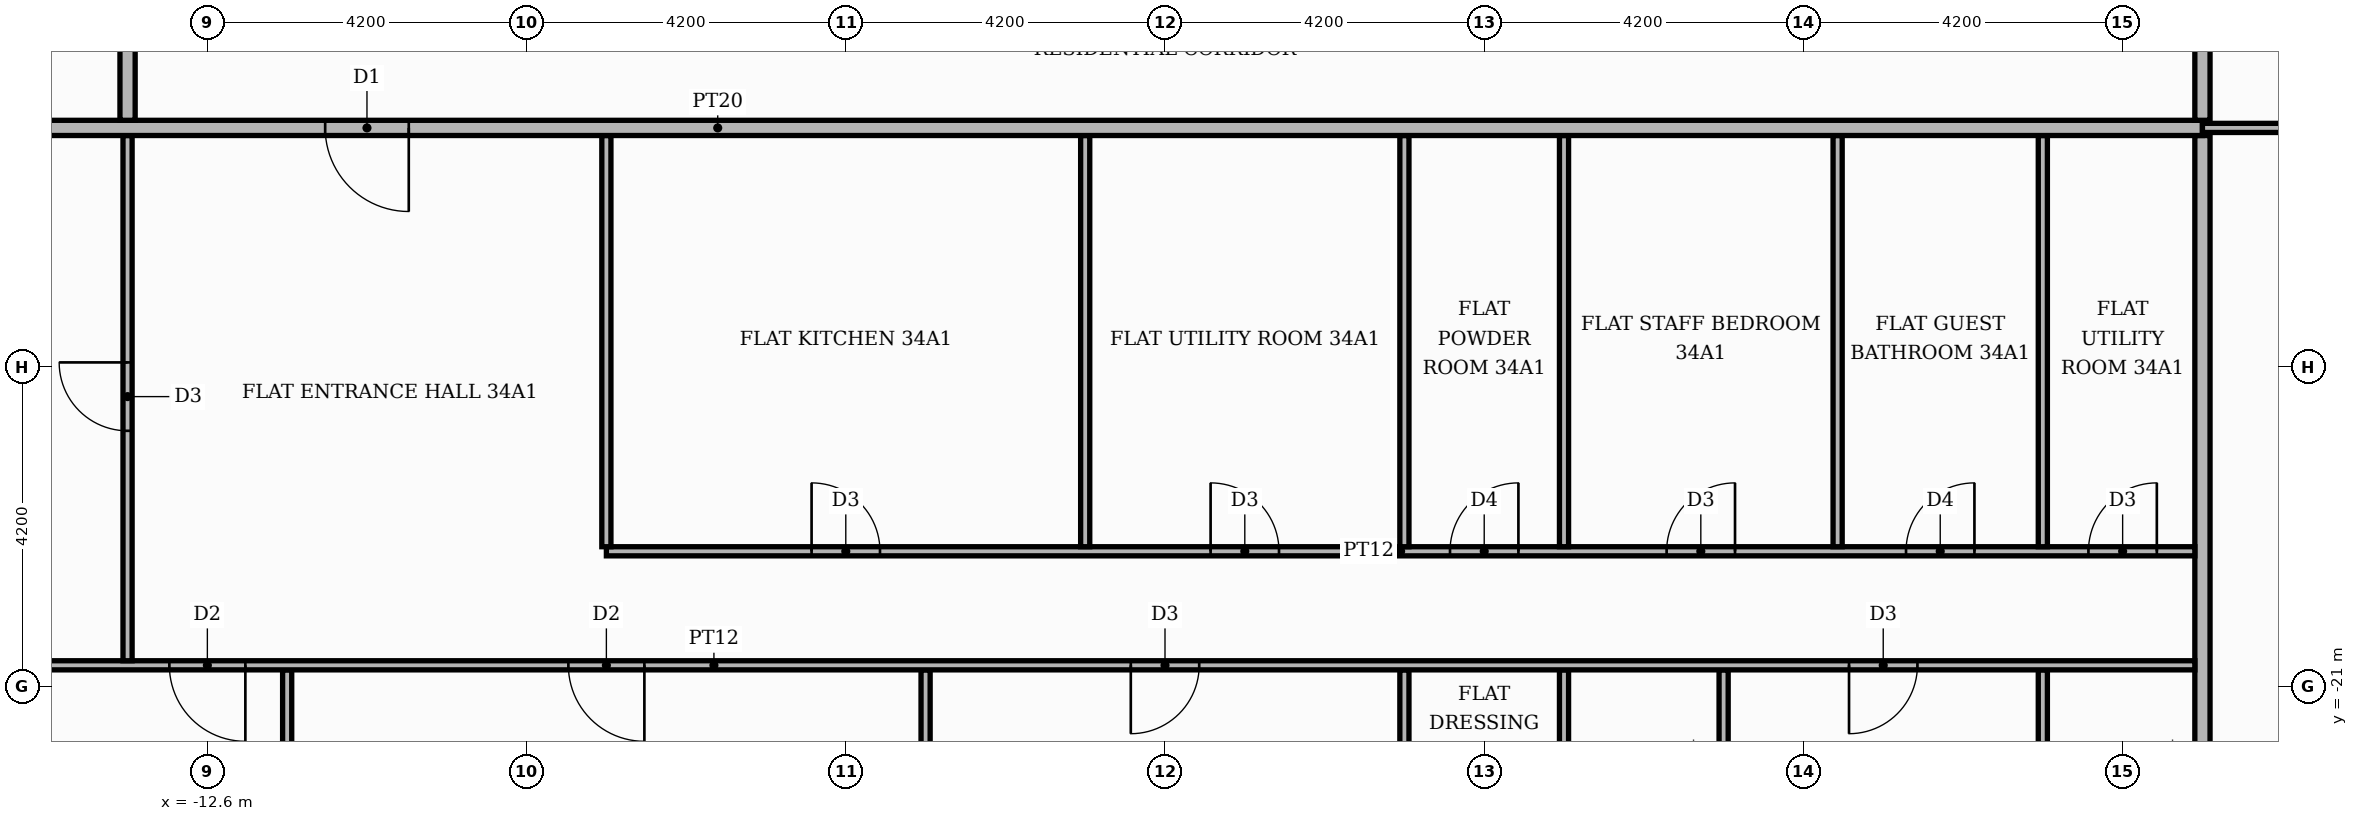
"""IFC4 building model, lengths in metres.
Left out: names, types, materials, properties, quantities, classifications, styles, units other than length and angle.
Written with IfcOpenShell. Run it as: python <this file> out.ifc"""

import sys

from ifc_helpers import new_model, si_unit, direction, frame, frame_2d, origin, place, context, subcontext, project, spatial, rectangle, extrude, element, fill, save


model = new_model("IFC4")
c1 = context("Model", 3, precision=1e-05, world=origin(), true_north=direction((0.0, 1.0)))
c2 = subcontext(c1, "Body", "Model", "MODEL_VIEW")
j1 = project(units=[si_unit("LENGTHUNIT", "METRE"), si_unit("PLANEANGLEUNIT", "RADIAN")], contexts=[c1])
p1 = place(None, origin())
s1 = spatial("IfcSite", under=j1, at=p1, CompositionType="ELEMENT")
p2 = place(p1, origin())
s2 = spatial("IfcBuilding", under=s1, at=p2, CompositionType="ELEMENT")
p3 = place(p2, frame((0.0, 0.0, 145.5)))
s3 = spatial("IfcBuildingStorey", under=s2, at=p3, CompositionType="ELEMENT", Elevation=145.5)
for number, where, z_axis, x_axis in (
    (1, (-11.55, -25.42, 0.0), (0.0, 0.0, 1.0), (0.0, 1.0, 0.0)),
    (2, (-3.15, -25.42, 0.0), (0.0, 0.0, 1.0), (0.0, 1.0, 0.0)),
):
    element("IfcWall", number, at=place(p3, frame(where, z_axis=z_axis, x_axis=x_axis)), inside=s3, PredefinedType="PARTITIONING", context=c2, shape_type="SweptSolid", body=[
        extrude(rectangle(XDim=4.64, YDim=0.12, at=frame_2d((2.32, 0.0))), origin(), (0.0, 0.0, 1.0), 3.48),
    ])
p4 = place(p3, frame((3.15, -25.42, 0.0), z_axis=(0.0, 0.0, 1.0), x_axis=(0.0, 1.0, 0.0)))
e3 = element("IfcWall", 3, at=p4, inside=s3, PredefinedType="PARTITIONING", context=c2, shape_type="SweptSolid", body=[
    extrude(rectangle(XDim=4.64, YDim=0.12, at=frame_2d((2.32, 0.0))), origin(), (0.0, 0.0, 1.0), 3.48),
])
p5 = place(p4, frame((1.75, 0.0, 0.0)))
e4 = element("IfcOpeningElement", 4, at=p5, cuts=e3, PredefinedType="OPENING", context=c2, shape_type="SweptSolid", body=[
    extrude(rectangle(XDim=0.9, YDim=2.1, at=frame_2d((0.45, 1.05))), frame((0.0, 0.07, 0.0), z_axis=(0.0, -1.0, 0.0), x_axis=(1.0, 0.0, 0.0)), (0.0, 0.0, 1.0), 0.14),
])
p6 = place(p3, frame((5.25, -25.42, 0.0), z_axis=(0.0, 0.0, 1.0), x_axis=(0.0, 1.0, 0.0)))
e5 = element("IfcWall", 5, at=p6, inside=s3, PredefinedType="PARTITIONING", context=c2, shape_type="SweptSolid", body=[
    extrude(rectangle(XDim=4.64, YDim=0.12, at=frame_2d((2.32, 0.0))), origin(), (0.0, 0.0, 1.0), 3.48),
])
p7 = place(p6, frame((1.75, 0.0, 0.0)))
e6 = element("IfcOpeningElement", 6, at=p7, cuts=e5, PredefinedType="OPENING", context=c2, shape_type="SweptSolid", body=[
    extrude(rectangle(XDim=0.9, YDim=2.1, at=frame_2d((0.45, 1.05))), frame((0.0, 0.07, 0.0), z_axis=(0.0, -1.0, 0.0), x_axis=(1.0, 0.0, 0.0)), (0.0, 0.0, 1.0), 0.14),
])
p8 = place(p3, frame((7.35, -25.42, 0.0), z_axis=(0.0, 0.0, 1.0), x_axis=(0.0, 1.0, 0.0)))
e7 = element("IfcWall", 7, at=p8, inside=s3, PredefinedType="PARTITIONING", context=c2, shape_type="SweptSolid", body=[
    extrude(rectangle(XDim=4.64, YDim=0.12, at=frame_2d((2.32, 0.0))), origin(), (0.0, 0.0, 1.0), 3.48),
])
p9 = place(p3, frame((11.55, -25.42, 0.0), z_axis=(0.0, 0.0, 1.0), x_axis=(0.0, 1.0, 0.0)))
e8 = element("IfcWall", 8, at=p9, inside=s3, PredefinedType="PARTITIONING", context=c2, shape_type="SweptSolid", body=[
    extrude(rectangle(XDim=4.64, YDim=0.12, at=frame_2d((2.32, 0.0))), origin(), (0.0, 0.0, 1.0), 3.48),
])
p10 = place(p9, frame((1.75, 0.0, 0.0)))
e9 = element("IfcOpeningElement", 9, at=p10, cuts=e8, PredefinedType="OPENING", context=c2, shape_type="SweptSolid", body=[
    extrude(rectangle(XDim=0.9, YDim=2.1, at=frame_2d((0.45, 1.05))), frame((0.0, 0.07, 0.0), z_axis=(0.0, -1.0, 0.0), x_axis=(1.0, 0.0, 0.0)), (0.0, 0.0, 1.0), 0.14),
])
p11 = place(p3, frame((13.65, -25.42, 0.0), z_axis=(0.0, 0.0, 1.0), x_axis=(0.0, 1.0, 0.0)))
e10 = element("IfcWall", 10, at=p11, inside=s3, PredefinedType="PARTITIONING", context=c2, shape_type="SweptSolid", body=[
    extrude(rectangle(XDim=11.67, YDim=0.2, at=frame_2d((5.835, 0.0))), origin(), (0.0, 0.0, 1.0), 3.48),
])
p12 = place(p3, frame((-25.42, -20.72, 0.0), z_axis=(0.0, 0.0, 1.0), x_axis=(1.0, 0.0, 0.0)))
e11 = element("IfcWall", 11, at=p12, inside=s3, PredefinedType="PARTITIONING", context=c2, shape_type="SweptSolid", body=[
    extrude(rectangle(XDim=38.97, YDim=0.12, at=frame_2d((19.485, 0.0))), origin(), (0.0, 0.0, 1.0), 3.48),
])
p13 = place(p12, frame((12.32, 0.0, 0.0)))
e12 = element("IfcOpeningElement", 12, at=p13, cuts=e11, PredefinedType="OPENING", context=c2, shape_type="SweptSolid", body=[
    extrude(rectangle(XDim=1.0, YDim=2.1, at=frame_2d((0.5, 1.05))), frame((0.0, 0.07, 0.0), z_axis=(0.0, -1.0, 0.0), x_axis=(1.0, 0.0, 0.0)), (0.0, 0.0, 1.0), 0.14),
])
p14 = place(p12, frame((17.57, 0.0, 0.0)))
e13 = element("IfcOpeningElement", 13, at=p14, cuts=e11, PredefinedType="OPENING", context=c2, shape_type="SweptSolid", body=[
    extrude(rectangle(XDim=1.0, YDim=2.1, at=frame_2d((0.5, 1.05))), frame((0.0, 0.07, 0.0), z_axis=(0.0, -1.0, 0.0), x_axis=(1.0, 0.0, 0.0)), (0.0, 0.0, 1.0), 0.14),
])
p15 = place(p12, frame((24.97, 0.0, 0.0)))
e14 = element("IfcOpeningElement", 14, at=p15, cuts=e11, PredefinedType="OPENING", context=c2, shape_type="SweptSolid", body=[
    extrude(rectangle(XDim=0.9, YDim=2.1, at=frame_2d((0.45, 1.05))), frame((0.0, 0.07, 0.0), z_axis=(0.0, -1.0, 0.0), x_axis=(1.0, 0.0, 0.0)), (0.0, 0.0, 1.0), 0.14),
])
p16 = place(p12, frame((34.42, 0.0, 0.0)))
e15 = element("IfcOpeningElement", 15, at=p16, cuts=e11, PredefinedType="OPENING", context=c2, shape_type="SweptSolid", body=[
    extrude(rectangle(XDim=0.9, YDim=2.1, at=frame_2d((0.45, 1.05))), frame((0.0, 0.07, 0.0), z_axis=(0.0, -1.0, 0.0), x_axis=(1.0, 0.0, 0.0)), (0.0, 0.0, 1.0), 0.14),
])
p17 = place(p3, frame((-13.65, -20.66, 0.0), z_axis=(0.0, 0.0, 1.0), x_axis=(0.0, 1.0, 0.0)))
e16 = element("IfcWall", 16, at=p17, inside=s3, PredefinedType="PARTITIONING", context=c2, shape_type="SweptSolid", body=[
    extrude(rectangle(XDim=6.91, YDim=0.12, at=frame_2d((3.455, 0.0))), origin(), (0.0, 0.0, 1.0), 3.48),
])
p18 = place(p17, frame((3.025, 0.0, 0.0)))
e17 = element("IfcOpeningElement", 17, at=p18, cuts=e16, PredefinedType="OPENING", context=c2, shape_type="SweptSolid", body=[
    extrude(rectangle(XDim=0.9, YDim=2.1, at=frame_2d((0.45, 1.05))), frame((0.0, 0.07, 0.0), z_axis=(0.0, -1.0, 0.0), x_axis=(1.0, 0.0, 0.0)), (0.0, 0.0, 1.0), 0.14),
])
p19 = place(p3, frame((-7.35, -19.22, 0.0), z_axis=(0.0, 0.0, 1.0), x_axis=(1.0, 0.0, 0.0)))
e18 = element("IfcWall", 18, at=p19, inside=s3, PredefinedType="PARTITIONING", context=c2, shape_type="SweptSolid", body=[
    extrude(rectangle(XDim=20.9, YDim=0.12, at=frame_2d((10.45, 0.0))), origin(), (0.0, 0.0, 1.0), 3.48),
])
p20 = place(p19, frame((2.7, 0.0, 0.0)))
e19 = element("IfcOpeningElement", 19, at=p20, cuts=e18, PredefinedType="OPENING", context=c2, shape_type="SweptSolid", body=[
    extrude(rectangle(XDim=0.9, YDim=2.1, at=frame_2d((0.45, 1.05))), frame((0.0, 0.07, 0.0), z_axis=(0.0, -1.0, 0.0), x_axis=(1.0, 0.0, 0.0)), (0.0, 0.0, 1.0), 0.14),
])
p21 = place(p19, frame((7.95, 0.0, 0.0)))
e20 = element("IfcOpeningElement", 20, at=p21, cuts=e18, PredefinedType="OPENING", context=c2, shape_type="SweptSolid", body=[
    extrude(rectangle(XDim=0.9, YDim=2.1, at=frame_2d((0.45, 1.05))), frame((0.0, 0.07, 0.0), z_axis=(0.0, -1.0, 0.0), x_axis=(1.0, 0.0, 0.0)), (0.0, 0.0, 1.0), 0.14),
])
p22 = place(p19, frame((11.1, 0.0, 0.0)))
e21 = element("IfcOpeningElement", 21, at=p22, cuts=e18, PredefinedType="OPENING", context=c2, shape_type="SweptSolid", body=[
    extrude(rectangle(XDim=0.9, YDim=2.1, at=frame_2d((0.45, 1.05))), frame((0.0, 0.07, 0.0), z_axis=(0.0, -1.0, 0.0), x_axis=(1.0, 0.0, 0.0)), (0.0, 0.0, 1.0), 0.14),
])
p23 = place(p19, frame((13.95, 0.0, 0.0)))
e22 = element("IfcOpeningElement", 22, at=p23, cuts=e18, PredefinedType="OPENING", context=c2, shape_type="SweptSolid", body=[
    extrude(rectangle(XDim=0.9, YDim=2.1, at=frame_2d((0.45, 1.05))), frame((0.0, 0.07, 0.0), z_axis=(0.0, -1.0, 0.0), x_axis=(1.0, 0.0, 0.0)), (0.0, 0.0, 1.0), 0.14),
])
p24 = place(p19, frame((17.1, 0.0, 0.0)))
e23 = element("IfcOpeningElement", 23, at=p24, cuts=e18, PredefinedType="OPENING", context=c2, shape_type="SweptSolid", body=[
    extrude(rectangle(XDim=0.9, YDim=2.1, at=frame_2d((0.45, 1.05))), frame((0.0, 0.07, 0.0), z_axis=(0.0, -1.0, 0.0), x_axis=(1.0, 0.0, 0.0)), (0.0, 0.0, 1.0), 0.14),
])
p25 = place(p19, frame((19.5, 0.0, 0.0)))
e24 = element("IfcOpeningElement", 24, at=p25, cuts=e18, PredefinedType="OPENING", context=c2, shape_type="SweptSolid", body=[
    extrude(rectangle(XDim=0.9, YDim=2.1, at=frame_2d((0.45, 1.05))), frame((0.0, 0.07, 0.0), z_axis=(0.0, -1.0, 0.0), x_axis=(1.0, 0.0, 0.0)), (0.0, 0.0, 1.0), 0.14),
])
for number, where, z_axis, x_axis in (
    (25, (-7.35, -19.16, 0.0), (0.0, 0.0, 1.0), (0.0, 1.0, 0.0)),
    (26, (-1.05, -19.16, 0.0), (0.0, 0.0, 1.0), (0.0, 1.0, 0.0)),
    (27, (3.15, -19.16, 0.0), (0.0, 0.0, 1.0), (0.0, 1.0, 0.0)),
    (28, (5.25, -19.16, 0.0), (0.0, 0.0, 1.0), (0.0, 1.0, 0.0)),
    (29, (8.85, -19.16, 0.0), (0.0, 0.0, 1.0), (0.0, 1.0, 0.0)),
    (30, (11.55, -19.16, 0.0), (0.0, 0.0, 1.0), (0.0, 1.0, 0.0)),
):
    element("IfcWall", number, at=place(p3, frame(where, z_axis=z_axis, x_axis=x_axis)), inside=s3, PredefinedType="PARTITIONING", context=c2, shape_type="SweptSolid", body=[
        extrude(rectangle(XDim=5.41, YDim=0.12, at=frame_2d((2.705, 0.0))), origin(), (0.0, 0.0, 1.0), 3.48),
    ])
p26 = place(p3, frame((-25.42, -13.65, 0.0), z_axis=(0.0, 0.0, 1.0), x_axis=(1.0, 0.0, 0.0)))
e31 = element("IfcWall", 31, at=p26, inside=s3, PredefinedType="PARTITIONING", context=c2, shape_type="SweptSolid", body=[
    extrude(rectangle(XDim=39.07, YDim=0.2, at=frame_2d((19.535, 0.0))), origin(), (0.0, 0.0, 1.0), 3.48),
])
p27 = place(p26, frame((14.37, 0.0, 0.0)))
e32 = element("IfcOpeningElement", 32, at=p27, cuts=e31, PredefinedType="OPENING", context=c2, shape_type="SweptSolid", body=[
    extrude(rectangle(XDim=1.1, YDim=2.4, at=frame_2d((0.55, 1.2))), frame((0.0, 0.11, 0.0), z_axis=(0.0, -1.0, 0.0), x_axis=(1.0, 0.0, 0.0)), (0.0, 0.0, 1.0), 0.22),
])
p28 = place(p3, frame((13.65, -13.65, 0.0), z_axis=(0.0, 0.0, 1.0), x_axis=(1.0, 0.0, 0.0)))
e33 = element("IfcWall", 33, at=p28, inside=s3, PredefinedType="PARTITIONING", context=c2, shape_type="SweptSolid", body=[
    extrude(rectangle(XDim=6.77, YDim=0.12, at=frame_2d((3.385, 0.0))), origin(), (0.0, 0.0, 1.0), 3.48),
])
p29 = place(p28, frame((2.935, 0.0, 0.0)))
e34 = element("IfcOpeningElement", 34, at=p29, cuts=e33, PredefinedType="OPENING", context=c2, shape_type="SweptSolid", body=[
    extrude(rectangle(XDim=0.9, YDim=2.1, at=frame_2d((0.45, 1.05))), frame((0.0, 0.07, 0.0), z_axis=(0.0, -1.0, 0.0), x_axis=(1.0, 0.0, 0.0)), (0.0, 0.0, 1.0), 0.14),
])
for number, where, z_axis, x_axis in (
    (35, (-13.65, -13.55, 0.0), (0.0, 0.0, 1.0), (0.0, 1.0, 0.0)),
    (36, (13.65, -13.55, 0.0), (0.0, 0.0, 1.0), (0.0, 1.0, 0.0)),
):
    element("IfcWall", number, at=place(p3, frame(where, z_axis=z_axis, x_axis=x_axis)), inside=s3, PredefinedType="PARTITIONING", context=c2, shape_type="SweptSolid", body=[
        extrude(rectangle(XDim=2.45, YDim=0.2, at=frame_2d((1.225, 0.0))), origin(), (0.0, 0.0, 1.0), 3.48),
    ])
p30 = place(p27, frame((1.1, 0.0, 0.0), z_axis=(0.0, 0.0, 1.0), x_axis=(-1.0, 0.0, 0.0)))
e37 = element("IfcDoor", 37, at=p30, inside=s3, OperationType="SINGLE_SWING_RIGHT", PredefinedType="DOOR", context=c2, shape_type="SweptSolid", body=[
    extrude(rectangle(XDim=1.1, YDim=2.4, at=frame_2d((0.55, 1.2))), frame((0.0, 0.025, 0.0), z_axis=(0.0, -1.0, 0.0), x_axis=(1.0, 0.0, 0.0)), (0.0, 0.0, 1.0), 0.05),
])
fill(e32, e37)
p31 = place(p18, origin())
e38 = element("IfcDoor", 38, at=p31, inside=s3, OperationType="SINGLE_SWING_RIGHT", PredefinedType="DOOR", context=c2, shape_type="SweptSolid", body=[
    extrude(rectangle(XDim=0.9, YDim=2.1, at=frame_2d((0.45, 1.05))), frame((0.0, 0.025, 0.0), z_axis=(0.0, -1.0, 0.0), x_axis=(1.0, 0.0, 0.0)), (0.0, 0.0, 1.0), 0.05),
])
fill(e17, e38)
p32 = place(p20, origin())
e39 = element("IfcDoor", 39, at=p32, inside=s3, OperationType="SINGLE_SWING_LEFT", PredefinedType="DOOR", context=c2, shape_type="SweptSolid", body=[
    extrude(rectangle(XDim=0.9, YDim=2.1, at=frame_2d((0.45, 1.05))), frame((0.0, 0.025, 0.0), z_axis=(0.0, -1.0, 0.0), x_axis=(1.0, 0.0, 0.0)), (0.0, 0.0, 1.0), 0.05),
])
fill(e19, e39)
p33 = place(p21, origin())
e40 = element("IfcDoor", 40, at=p33, inside=s3, OperationType="SINGLE_SWING_LEFT", PredefinedType="DOOR", context=c2, shape_type="SweptSolid", body=[
    extrude(rectangle(XDim=0.9, YDim=2.1, at=frame_2d((0.45, 1.05))), frame((0.0, 0.025, 0.0), z_axis=(0.0, -1.0, 0.0), x_axis=(1.0, 0.0, 0.0)), (0.0, 0.0, 1.0), 0.05),
])
fill(e20, e40)
p34 = place(p22, origin())
e41 = element("IfcDoor", 41, at=p34, inside=s3, OperationType="SINGLE_SWING_RIGHT", PredefinedType="DOOR", context=c2, shape_type="SweptSolid", body=[
    extrude(rectangle(XDim=0.9, YDim=2.1, at=frame_2d((0.45, 1.05))), frame((0.0, 0.025, 0.0), z_axis=(0.0, -1.0, 0.0), x_axis=(1.0, 0.0, 0.0)), (0.0, 0.0, 1.0), 0.05),
])
fill(e21, e41)
p35 = place(p23, origin())
e42 = element("IfcDoor", 42, at=p35, inside=s3, OperationType="SINGLE_SWING_RIGHT", PredefinedType="DOOR", context=c2, shape_type="SweptSolid", body=[
    extrude(rectangle(XDim=0.9, YDim=2.1, at=frame_2d((0.45, 1.05))), frame((0.0, 0.025, 0.0), z_axis=(0.0, -1.0, 0.0), x_axis=(1.0, 0.0, 0.0)), (0.0, 0.0, 1.0), 0.05),
])
fill(e22, e42)
p36 = place(p24, origin())
e43 = element("IfcDoor", 43, at=p36, inside=s3, OperationType="SINGLE_SWING_RIGHT", PredefinedType="DOOR", context=c2, shape_type="SweptSolid", body=[
    extrude(rectangle(XDim=0.9, YDim=2.1, at=frame_2d((0.45, 1.05))), frame((0.0, 0.025, 0.0), z_axis=(0.0, -1.0, 0.0), x_axis=(1.0, 0.0, 0.0)), (0.0, 0.0, 1.0), 0.05),
])
fill(e23, e43)
p37 = place(p25, origin())
e44 = element("IfcDoor", 44, at=p37, inside=s3, OperationType="SINGLE_SWING_RIGHT", PredefinedType="DOOR", context=c2, shape_type="SweptSolid", body=[
    extrude(rectangle(XDim=0.9, YDim=2.1, at=frame_2d((0.45, 1.05))), frame((0.0, 0.025, 0.0), z_axis=(0.0, -1.0, 0.0), x_axis=(1.0, 0.0, 0.0)), (0.0, 0.0, 1.0), 0.05),
])
fill(e24, e44)
p38 = place(p13, frame((1.0, 0.0, 0.0), z_axis=(0.0, 0.0, 1.0), x_axis=(-1.0, 0.0, 0.0)))
e45 = element("IfcDoor", 45, at=p38, inside=s3, OperationType="SINGLE_SWING_RIGHT", PredefinedType="DOOR", context=c2, shape_type="SweptSolid", body=[
    extrude(rectangle(XDim=1.0, YDim=2.1, at=frame_2d((0.5, 1.05))), frame((0.0, 0.025, 0.0), z_axis=(0.0, -1.0, 0.0), x_axis=(1.0, 0.0, 0.0)), (0.0, 0.0, 1.0), 0.05),
])
fill(e12, e45)
p39 = place(p14, frame((1.0, 0.0, 0.0), z_axis=(0.0, 0.0, 1.0), x_axis=(-1.0, 0.0, 0.0)))
e46 = element("IfcDoor", 46, at=p39, inside=s3, OperationType="SINGLE_SWING_RIGHT", PredefinedType="DOOR", context=c2, shape_type="SweptSolid", body=[
    extrude(rectangle(XDim=1.0, YDim=2.1, at=frame_2d((0.5, 1.05))), frame((0.0, 0.025, 0.0), z_axis=(0.0, -1.0, 0.0), x_axis=(1.0, 0.0, 0.0)), (0.0, 0.0, 1.0), 0.05),
])
fill(e13, e46)
p40 = place(p15, frame((0.9, 0.0, 0.0), z_axis=(0.0, 0.0, 1.0), x_axis=(-1.0, 0.0, 0.0)))
e47 = element("IfcDoor", 47, at=p40, inside=s3, OperationType="SINGLE_SWING_LEFT", PredefinedType="DOOR", context=c2, shape_type="SweptSolid", body=[
    extrude(rectangle(XDim=0.9, YDim=2.1, at=frame_2d((0.45, 1.05))), frame((0.0, 0.025, 0.0), z_axis=(0.0, -1.0, 0.0), x_axis=(1.0, 0.0, 0.0)), (0.0, 0.0, 1.0), 0.05),
])
fill(e14, e47)
p41 = place(p16, frame((0.9, 0.0, 0.0), z_axis=(0.0, 0.0, 1.0), x_axis=(-1.0, 0.0, 0.0)))
e48 = element("IfcDoor", 48, at=p41, inside=s3, OperationType="SINGLE_SWING_LEFT", PredefinedType="DOOR", context=c2, shape_type="SweptSolid", body=[
    extrude(rectangle(XDim=0.9, YDim=2.1, at=frame_2d((0.45, 1.05))), frame((0.0, 0.025, 0.0), z_axis=(0.0, -1.0, 0.0), x_axis=(1.0, 0.0, 0.0)), (0.0, 0.0, 1.0), 0.05),
])
fill(e15, e48)
save(model, sys.argv[1])
